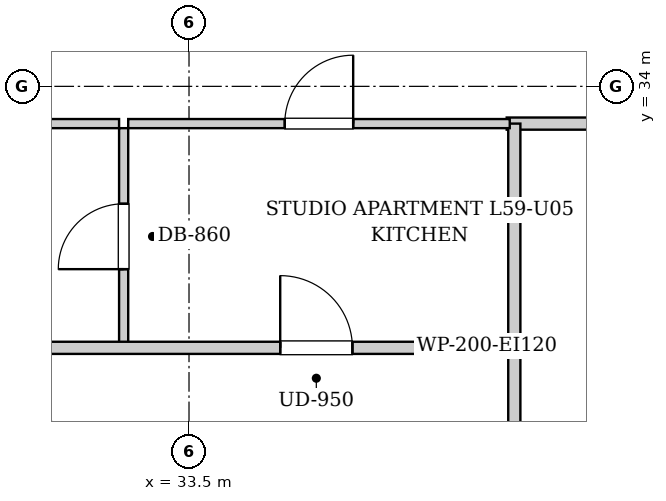
"""IFC4 building model, lengths in metres.
Left out: names, types, materials, properties, quantities, classifications, styles, units other than length and angle.
Written with IfcOpenShell. Run it as: python <this file> out.ifc"""

import sys

from ifc_helpers import new_model, si_unit, direction, frame, frame_2d, origin, place, context, subcontext, project, spatial, rectangle, extrude, element, fill, save


model = new_model("IFC4")
c1 = context("Model", 3, precision=1e-05, world=origin(), true_north=direction((0.0, 1.0)))
c2 = subcontext(c1, "Body", "Model", "MODEL_VIEW")
j1 = project(units=[si_unit("LENGTHUNIT", "METRE"), si_unit("PLANEANGLEUNIT", "RADIAN")], contexts=[c1])
p1 = place(None, origin())
s1 = spatial("IfcSite", under=j1, at=p1, CompositionType="ELEMENT")
p2 = place(p1, origin())
s2 = spatial("IfcBuilding", under=s1, at=p2, CompositionType="ELEMENT")
p3 = place(p2, frame((0.0, 0.0, 204.1)))
s3 = spatial("IfcBuildingStorey", under=s2, at=p3, CompositionType="ELEMENT", Elevation=204.1)
p4 = place(p3, frame((37.78, 28.98, 0.0), z_axis=(0.0, 0.0, 1.0), x_axis=(0.0, 1.0, 0.0)))
e1 = element("IfcWall", 1, at=p4, inside=s3, PredefinedType="PARTITIONING", context=c2, shape_type="SweptSolid", body=[
    extrude(rectangle(XDim=1.58, YDim=0.16, at=frame_2d((0.79, 0.0))), origin(), (0.0, 0.0, 1.0), 3.04),
])
p5 = place(p3, frame((37.68, 33.51, 0.0), z_axis=(0.0, 0.0, 1.0), x_axis=(1.0, 0.0, 0.0)))
e2 = element("IfcWall", 2, at=p5, inside=s3, PredefinedType="PARTITIONING", context=c2, shape_type="SweptSolid", body=[
    extrude(rectangle(XDim=2.34, YDim=0.16, at=frame_2d((1.17, 0.0))), origin(), (0.0, 0.0, 1.0), 3.04),
])
p6 = place(p3, frame((37.78, 30.6, 0.0), z_axis=(0.0, 0.0, 1.0), x_axis=(0.0, 1.0, 0.0)))
e3 = element("IfcWall", 3, at=p6, inside=s3, PredefinedType="PARTITIONING", context=c2, shape_type="SweptSolid", body=[
    extrude(rectangle(XDim=2.91, YDim=0.16, at=frame_2d((1.455, 0.0))), origin(), (0.0, 0.0, 1.0), 3.04),
])
p7 = place(p3, frame((32.64, 30.6, 0.0), z_axis=(0.0, 0.0, 1.0), x_axis=(0.0, 1.0, 0.0)))
e4 = element("IfcWall", 4, at=p7, inside=s3, PredefinedType="PARTITIONING", context=c2, shape_type="SweptSolid", body=[
    extrude(rectangle(XDim=2.85, YDim=0.12, at=frame_2d((1.425, 0.0))), origin(), (0.0, 0.0, 1.0), 3.04),
])
p8 = place(p7, frame((0.995, 0.0, 0.0)))
e5 = element("IfcOpeningElement", 5, at=p8, cuts=e4, PredefinedType="OPENING", context=c2, shape_type="SweptSolid", body=[
    extrude(rectangle(XDim=0.86, YDim=2.05, at=frame_2d((0.43, 1.025))), frame((0.0, 0.07, 0.0), z_axis=(0.0, -1.0, 0.0), x_axis=(1.0, 0.0, 0.0)), (0.0, 0.0, 1.0), 0.14),
])
p9 = place(p3, frame((30.377, 33.51, 0.0), z_axis=(0.0, 0.0, 1.0), x_axis=(1.0, 0.0, 0.0)))
e6 = element("IfcWall", 6, at=p9, inside=s3, PredefinedType="PARTITIONING", context=c2, shape_type="SweptSolid", body=[
    extrude(rectangle(XDim=2.203, YDim=0.12, at=frame_2d((1.102, 0.0))), origin(), (0.0, 0.0, 1.0), 3.04),
])
p10 = place(p3, frame((32.7, 33.51, 0.0), z_axis=(0.0, 0.0, 1.0), x_axis=(1.0, 0.0, 0.0)))
e7 = element("IfcWall", 7, at=p10, inside=s3, PredefinedType="PARTITIONING", context=c2, shape_type="SweptSolid", body=[
    extrude(rectangle(XDim=5.02, YDim=0.12, at=frame_2d((2.51, 0.0))), origin(), (0.0, 0.0, 1.0), 3.04),
])
p11 = place(p10, frame((2.06, 0.0, 0.0)))
e8 = element("IfcOpeningElement", 8, at=p11, cuts=e7, PredefinedType="OPENING", context=c2, shape_type="SweptSolid", body=[
    extrude(rectangle(XDim=0.9, YDim=2.05, at=frame_2d((0.45, 1.025))), frame((0.0, 0.07, 0.0), z_axis=(0.0, -1.0, 0.0), x_axis=(1.0, 0.0, 0.0)), (0.0, 0.0, 1.0), 0.14),
])
p12 = place(p3, frame((13.15, 30.56, 0.0), z_axis=(0.0, 0.0, 1.0), x_axis=(1.0, 0.0, 0.0)))
e9 = element("IfcWall", 9, at=p12, inside=s3, PredefinedType="PARTITIONING", context=c2, shape_type="SweptSolid", body=[
    extrude(rectangle(XDim=24.6, YDim=0.16, at=frame_2d((12.3, 0.0))), origin(), (0.0, 0.0, 1.0), 3.04),
])
p13 = place(p12, frame((3.115, 0.0, 0.0)))
e10 = element("IfcOpeningElement", 10, at=p13, cuts=e9, PredefinedType="OPENING", context=c2, shape_type="SweptSolid", body=[
    extrude(rectangle(XDim=0.95, YDim=2.1, at=frame_2d((0.475, 1.05))), frame((0.0, 0.09, 0.0), z_axis=(0.0, -1.0, 0.0), x_axis=(1.0, 0.0, 0.0)), (0.0, 0.0, 1.0), 0.18),
])
p14 = place(p12, frame((21.55, 0.0, 0.0)))
e11 = element("IfcOpeningElement", 11, at=p14, cuts=e9, PredefinedType="OPENING", context=c2, shape_type="SweptSolid", body=[
    extrude(rectangle(XDim=0.95, YDim=2.1, at=frame_2d((0.475, 1.05))), frame((0.0, 0.09, 0.0), z_axis=(0.0, -1.0, 0.0), x_axis=(1.0, 0.0, 0.0)), (0.0, 0.0, 1.0), 0.18),
])
p15 = place(p8, origin())
e12 = element("IfcDoor", 12, at=p15, inside=s3, OperationType="SINGLE_SWING_LEFT", PredefinedType="DOOR", context=c2, shape_type="SweptSolid", body=[
    extrude(rectangle(XDim=0.86, YDim=2.05, at=frame_2d((0.43, 1.025))), frame((0.0, 0.025, 0.0), z_axis=(0.0, -1.0, 0.0), x_axis=(1.0, 0.0, 0.0)), (0.0, 0.0, 1.0), 0.05),
])
fill(e5, e12)
p16 = place(p11, origin())
e13 = element("IfcDoor", 13, at=p16, inside=s3, OperationType="SINGLE_SWING_RIGHT", PredefinedType="DOOR", context=c2, shape_type="SweptSolid", body=[
    extrude(rectangle(XDim=0.9, YDim=2.05, at=frame_2d((0.45, 1.025))), frame((0.0, 0.025, 0.0), z_axis=(0.0, -1.0, 0.0), x_axis=(1.0, 0.0, 0.0)), (0.0, 0.0, 1.0), 0.05),
])
fill(e8, e13)
p17 = place(p14, origin())
e14 = element("IfcDoor", 14, at=p17, inside=s3, OperationType="SINGLE_SWING_LEFT", PredefinedType="DOOR", context=c2, shape_type="SweptSolid", body=[
    extrude(rectangle(XDim=0.95, YDim=2.1, at=frame_2d((0.475, 1.05))), frame((0.0, 0.025, 0.0), z_axis=(0.0, -1.0, 0.0), x_axis=(1.0, 0.0, 0.0)), (0.0, 0.0, 1.0), 0.05),
])
fill(e11, e14)
save(model, sys.argv[1])
